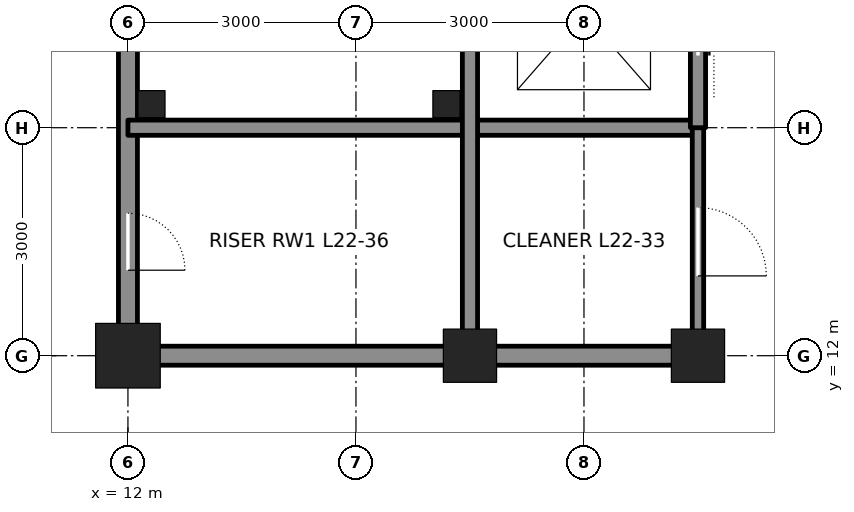
"""IFC4 building model, lengths in metres.
Left out: names, types, materials, properties, quantities, classifications, styles, units other than length and angle.
Written with IfcOpenShell. Run it as: python <this file> out.ifc"""

import sys

from ifc_helpers import new_model, si_unit, direction, frame, frame_2d, origin, origin_2d, place, context, subcontext, project, spatial, rectangle, hollow_rectangle, extrude, element, fill, save


model = new_model("IFC4")
c1 = context("Model", 3, precision=1e-05, world=origin(), true_north=direction((0.0, 1.0)))
c2 = subcontext(c1, "Body", "Model", "MODEL_VIEW")
j1 = project(units=[si_unit("LENGTHUNIT", "METRE"), si_unit("PLANEANGLEUNIT", "RADIAN")], contexts=[c1])
p1 = place(None, origin())
s1 = spatial("IfcSite", under=j1, at=p1, CompositionType="ELEMENT")
p2 = place(p1, origin())
s2 = spatial("IfcBuilding", under=s1, at=p2, CompositionType="ELEMENT")
p3 = place(p2, frame((0.0, 0.0, 106.8)))
s3 = spatial("IfcBuildingStorey", under=s2, at=p3, CompositionType="ELEMENT", Elevation=106.8)
p4 = place(p3, frame((12.0, 12.0, 0.0), z_axis=(0.0, 0.0, 1.0), x_axis=(1.0, 0.0, 0.0)))
e1 = element("IfcColumn", 1, at=p4, inside=s3, PredefinedType="COLUMN", context=c2, shape_type="SweptSolid", body=[
    extrude(hollow_rectangle(XDim=0.85, YDim=0.85, WallThickness=0.085, at=origin_2d()), origin(), (0.0, 0.0, 1.0), 4.2),
])
for number, where, z_axis, x_axis in (
    (2, (16.5, 12.0, 0.0), (0.0, 0.0, 1.0), (1.0, 0.0, 0.0)),
    (3, (19.5, 12.0, 0.0), (0.0, 0.0, 1.0), (1.0, 0.0, 0.0)),
):
    element("IfcColumn", number, at=place(p3, frame(where, z_axis=z_axis, x_axis=x_axis)), inside=s3, PredefinedType="COLUMN", context=c2, shape_type="SweptSolid", body=[
        extrude(hollow_rectangle(XDim=0.7, YDim=0.7, WallThickness=0.07, at=origin_2d()), origin(), (0.0, 0.0, 1.0), 4.2),
    ])
p5 = place(p3, frame((12.0, 12.25, 0.0), z_axis=(0.0, 0.0, 1.0), x_axis=(0.0, 1.0, 0.0)))
e4 = element("IfcWall", 4, at=p5, inside=s3, PredefinedType="SOLIDWALL", context=c2, shape_type="SweptSolid", body=[
    extrude(rectangle(XDim=8.5, YDim=0.25, at=frame_2d((4.25, 0.0))), origin(), (0.0, 0.0, 1.0), 3.113),
])
p6 = place(p5, frame((0.875, 0.0, 0.0)))
e5 = element("IfcOpeningElement", 5, at=p6, cuts=e4, PredefinedType="OPENING", context=c2, shape_type="SweptSolid", body=[
    extrude(rectangle(XDim=0.75, YDim=2.1, at=frame_2d((0.375, 1.05))), frame((0.0, 0.135, 0.0), z_axis=(0.0, -1.0, 0.0), x_axis=(1.0, 0.0, 0.0)), (0.0, 0.0, 1.0), 0.27),
])
p7 = place(p3, frame((12.25, 12.0, 0.0), z_axis=(0.0, 0.0, 1.0), x_axis=(1.0, 0.0, 0.0)))
e6 = element("IfcWall", 6, at=p7, inside=s3, PredefinedType="SOLIDWALL", context=c2, shape_type="SweptSolid", body=[
    extrude(rectangle(XDim=4.0, YDim=0.25, at=frame_2d((2.0, 0.0))), origin(), (0.0, 0.0, 1.0), 3.181),
])
p8 = place(p3, frame((16.75, 12.0, 0.0), z_axis=(0.0, 0.0, 1.0), x_axis=(1.0, 0.0, 0.0)))
e7 = element("IfcWall", 7, at=p8, inside=s3, PredefinedType="SOLIDWALL", context=c2, shape_type="SweptSolid", body=[
    extrude(rectangle(XDim=2.5, YDim=0.25, at=frame_2d((1.25, 0.0))), origin(), (0.0, 0.0, 1.0), 3.181),
])
p9 = place(p3, frame((12.0, 15.0, 0.0), z_axis=(0.0, 0.0, 1.0), x_axis=(1.0, 0.0, 0.0)))
e8 = element("IfcWall", 8, at=p9, inside=s3, PredefinedType="SOLIDWALL", context=c2, shape_type="SweptSolid", body=[
    extrude(rectangle(XDim=7.5, YDim=0.2, at=frame_2d((3.75, 0.0))), origin(), (0.0, 0.0, 1.0), 4.04),
])
p10 = place(p3, frame((16.5, 12.25, 0.0), z_axis=(0.0, 0.0, 1.0), x_axis=(0.0, 1.0, 0.0)))
e9 = element("IfcWall", 9, at=p10, inside=s3, PredefinedType="SOLIDWALL", context=c2, shape_type="SweptSolid", body=[
    extrude(rectangle(XDim=8.5, YDim=0.2, at=frame_2d((4.25, 0.0))), origin(), (0.0, 0.0, 1.0), 3.113),
])
p11 = place(p3, frame((19.5, 12.25, 0.0), z_axis=(0.0, 0.0, 1.0), x_axis=(0.0, 1.0, 0.0)))
e10 = element("IfcWall", 10, at=p11, inside=s3, PredefinedType="PARTITIONING", context=c2, shape_type="SweptSolid", body=[
    extrude(rectangle(XDim=2.75, YDim=0.15, at=frame_2d((1.375, 0.0))), origin(), (0.0, 0.0, 1.0), 3.064),
])
p12 = place(p11, frame((0.8, 0.0, 0.0)))
e11 = element("IfcOpeningElement", 11, at=p12, cuts=e10, PredefinedType="OPENING", context=c2, shape_type="SweptSolid", body=[
    extrude(rectangle(XDim=0.9, YDim=2.1, at=frame_2d((0.45, 1.05))), frame((0.0, 0.085, 0.0), z_axis=(0.0, -1.0, 0.0), x_axis=(1.0, 0.0, 0.0)), (0.0, 0.0, 1.0), 0.17),
])
p13 = place(p3, frame((19.5, 15.0, 0.0), z_axis=(0.0, 0.0, 1.0), x_axis=(0.0, 1.0, 0.0)))
e12 = element("IfcWall", 12, at=p13, inside=s3, PredefinedType="SOLIDWALL", context=c2, shape_type="SweptSolid", body=[
    extrude(rectangle(XDim=12.0, YDim=0.2, at=frame_2d((6.0, 0.0))), origin(), (0.0, 0.0, 1.0), 3.064),
])
p14 = place(p13, frame((0.95, 0.0, 0.0)))
e13 = element("IfcOpeningElement", 13, at=p14, cuts=e12, PredefinedType="OPENING", context=c2, shape_type="SweptSolid", body=[
    extrude(rectangle(XDim=1.1, YDim=2.1, at=frame_2d((0.55, 1.05))), frame((0.0, 0.11, 0.0), z_axis=(0.0, -1.0, 0.0), x_axis=(1.0, 0.0, 0.0)), (0.0, 0.0, 1.0), 0.22),
])
p15 = place(p13, frame((3.95, 0.0, 0.0)))
e14 = element("IfcOpeningElement", 14, at=p15, cuts=e12, PredefinedType="OPENING", context=c2, shape_type="SweptSolid", body=[
    extrude(rectangle(XDim=1.1, YDim=2.1, at=frame_2d((0.55, 1.05))), frame((0.0, 0.11, 0.0), z_axis=(0.0, -1.0, 0.0), x_axis=(1.0, 0.0, 0.0)), (0.0, 0.0, 1.0), 0.22),
])
p16 = place(p13, frame((6.95, 0.0, 0.0)))
e15 = element("IfcOpeningElement", 15, at=p16, cuts=e12, PredefinedType="OPENING", context=c2, shape_type="SweptSolid", body=[
    extrude(rectangle(XDim=1.1, YDim=2.1, at=frame_2d((0.55, 1.05))), frame((0.0, 0.11, 0.0), z_axis=(0.0, -1.0, 0.0), x_axis=(1.0, 0.0, 0.0)), (0.0, 0.0, 1.0), 0.22),
])
p17 = place(p13, frame((9.95, 0.0, 0.0)))
e16 = element("IfcOpeningElement", 16, at=p17, cuts=e12, PredefinedType="OPENING", context=c2, shape_type="SweptSolid", body=[
    extrude(rectangle(XDim=1.1, YDim=2.1, at=frame_2d((0.55, 1.05))), frame((0.0, 0.11, 0.0), z_axis=(0.0, -1.0, 0.0), x_axis=(1.0, 0.0, 0.0)), (0.0, 0.0, 1.0), 0.22),
])
for number, where, z_axis, x_axis in (
    (17, (12.31, 15.31, 0.0), (0.0, 0.0, 1.0), (1.0, 0.0, 0.0)),
    (18, (16.19, 15.31, 0.0), (0.0, 0.0, 1.0), (1.0, 0.0, 0.0)),
):
    element("IfcColumn", number, at=place(p3, frame(where, z_axis=z_axis, x_axis=x_axis)), inside=s3, PredefinedType="COLUMN", context=c2, shape_type="SweptSolid", body=[
        extrude(hollow_rectangle(XDim=0.356, YDim=0.356, WallThickness=0.015, at=origin_2d()), origin(), (0.0, 0.0, 1.0), 4.2),
    ])
p18 = place(p6, frame((0.75, 0.0, 0.0), z_axis=(0.0, 0.0, 1.0), x_axis=(-1.0, 0.0, 0.0)))
e19 = element("IfcDoor", 19, at=p18, inside=s3, OperationType="SINGLE_SWING_RIGHT", PredefinedType="DOOR", context=c2, shape_type="SweptSolid", body=[
    extrude(rectangle(XDim=0.75, YDim=2.1, at=frame_2d((0.375, 1.05))), frame((0.0, 0.025, 0.0), z_axis=(0.0, -1.0, 0.0), x_axis=(1.0, 0.0, 0.0)), (0.0, 0.0, 1.0), 0.05),
])
fill(e5, e19)
p19 = place(p12, frame((0.9, 0.0, 0.0), z_axis=(0.0, 0.0, 1.0), x_axis=(-1.0, 0.0, 0.0)))
e20 = element("IfcDoor", 20, at=p19, inside=s3, OperationType="SINGLE_SWING_RIGHT", PredefinedType="DOOR", context=c2, shape_type="SweptSolid", body=[
    extrude(rectangle(XDim=0.9, YDim=2.1, at=frame_2d((0.45, 1.05))), frame((0.0, 0.025, 0.0), z_axis=(0.0, -1.0, 0.0), x_axis=(1.0, 0.0, 0.0)), (0.0, 0.0, 1.0), 0.05),
])
fill(e11, e20)
p20 = place(p14, origin())
e21 = element("IfcDoor", 21, at=p20, inside=s3, OperationType="DOUBLE_DOOR_SLIDING", PredefinedType="DOOR", context=c2, shape_type="SweptSolid", body=[
    extrude(rectangle(XDim=1.1, YDim=2.1, at=frame_2d((0.55, 1.05))), frame((0.0, 0.025, 0.0), z_axis=(0.0, -1.0, 0.0), x_axis=(1.0, 0.0, 0.0)), (0.0, 0.0, 1.0), 0.05),
])
fill(e13, e21)
save(model, sys.argv[1])
